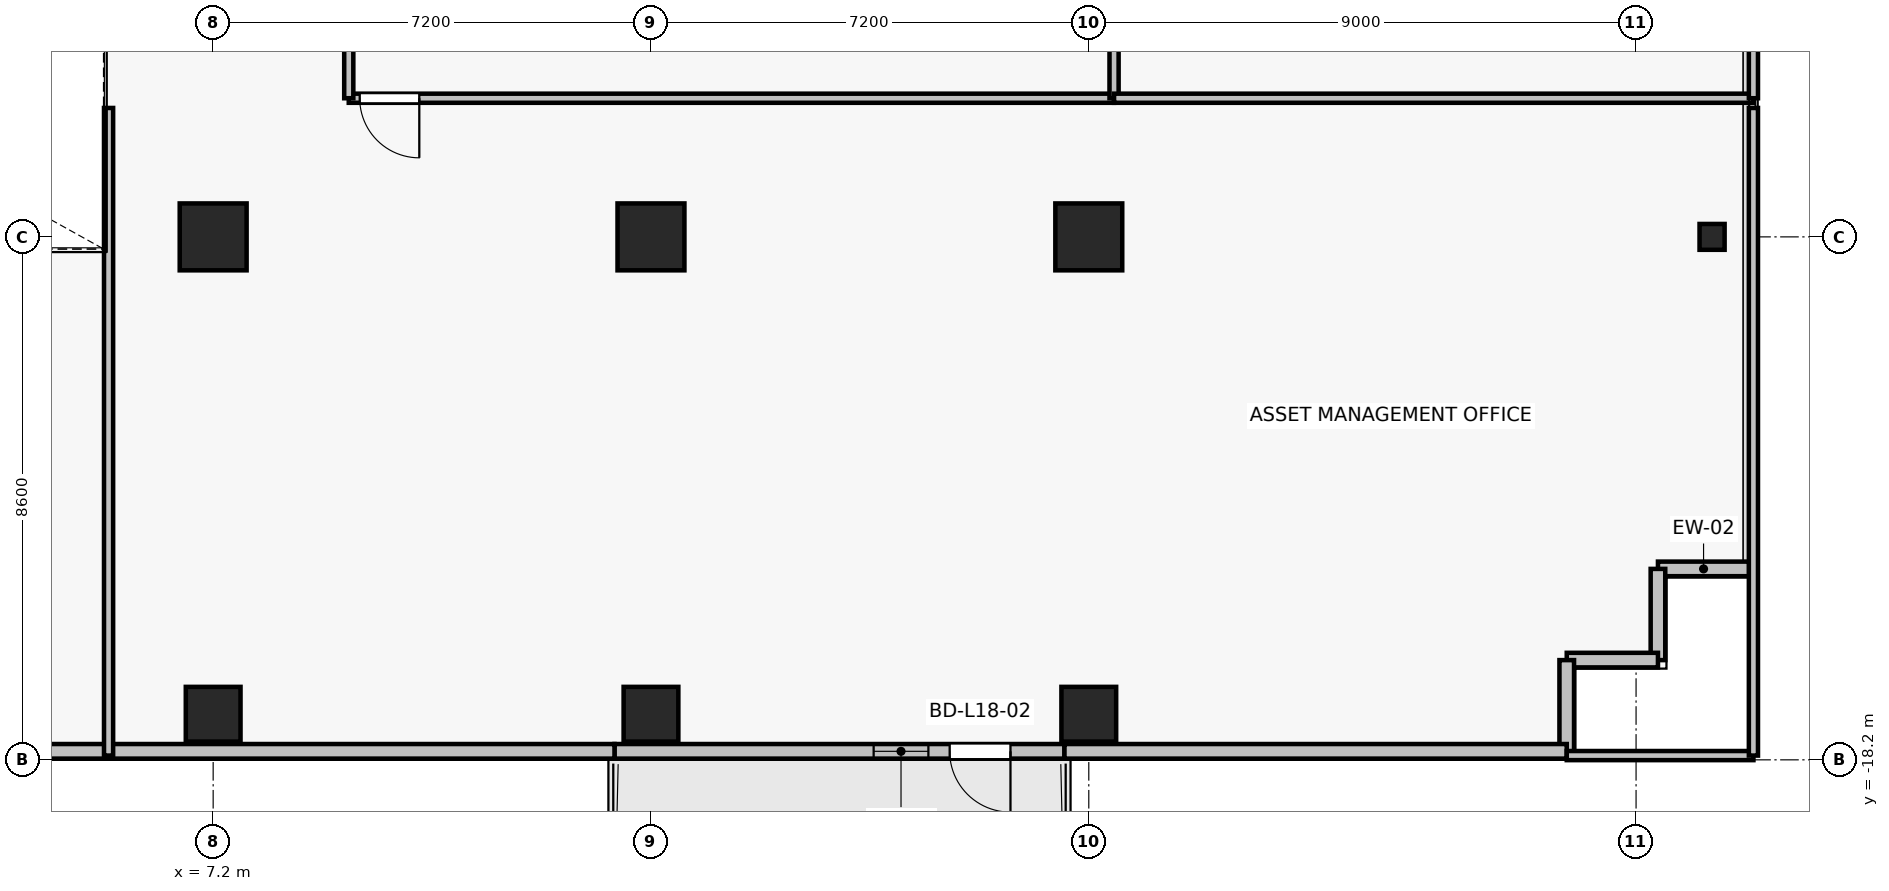
"""IFC4 building model, lengths in metres.
Left out: names, types, materials, properties, quantities, classifications, styles, units other than length and angle.
Written with IfcOpenShell. Run it as: python <this file> out.ifc"""

import sys

from ifc_helpers import new_model, si_unit, direction, frame, frame_2d, origin, origin_2d, place, context, subcontext, project, spatial, rectangle, i_section, extrude, source, transform, mapped, element, fill, save


model = new_model("IFC4")
c1 = context("Model", 3, precision=1e-05, world=origin(), true_north=direction((0.0, 1.0)))
c2 = subcontext(c1, "Body", "Model", "MODEL_VIEW")
j1 = project(units=[si_unit("LENGTHUNIT", "METRE"), si_unit("PLANEANGLEUNIT", "RADIAN")], contexts=[c1])
p1 = place(None, origin())
s1 = spatial("IfcSite", under=j1, at=p1, CompositionType="ELEMENT")
p2 = place(p1, origin())
s2 = spatial("IfcBuilding", under=s1, at=p2, CompositionType="ELEMENT")
p3 = place(p2, frame((0.0, 0.0, 67.0)))
s3 = spatial("IfcBuildingStorey", under=s2, at=p3, CompositionType="ELEMENT", Elevation=67.0)
for number, where, z_axis, x_axis in (
    (1, (7.2, -9.6, 0.0), (0.0, 0.0, 1.0), (1.0, 0.0, 0.0)),
    (2, (14.4, -9.6, 0.0), (0.0, 0.0, 1.0), (1.0, 0.0, 0.0)),
    (3, (21.6, -9.6, 0.0), (0.0, 0.0, 1.0), (1.0, 0.0, 0.0)),
):
    element("IfcColumn", number, at=place(p3, frame(where, z_axis=z_axis, x_axis=x_axis)), inside=s3, PredefinedType="COLUMN", context=c2, shape_type="SweptSolid", body=[
        extrude(rectangle(XDim=1.1, YDim=1.1, at=origin_2d()), origin(), (0.0, 0.0, 1.0), 3.3),
    ])
for number, where, z_axis, x_axis in (
    (4, (7.2, -17.45, 0.0), (0.0, 0.0, 1.0), (1.0, 0.0, 0.0)),
    (5, (14.4, -17.45, 0.0), (0.0, 0.0, 1.0), (1.0, 0.0, 0.0)),
    (6, (21.6, -17.45, 0.0), (0.0, 0.0, 1.0), (1.0, 0.0, 0.0)),
):
    element("IfcColumn", number, at=place(p3, frame(where, z_axis=z_axis, x_axis=x_axis)), inside=s3, PredefinedType="COLUMN", context=c2, shape_type="SweptSolid", body=[
        extrude(rectangle(XDim=0.9, YDim=0.9, at=origin_2d()), origin(), (0.0, 0.0, 1.0), 3.3),
    ])
p4 = place(p3, frame((31.85, -9.6, 0.0), z_axis=(0.0, 0.0, 1.0), x_axis=(1.0, 0.0, 0.0)))
e7 = element("IfcColumn", 7, at=p4, inside=s3, PredefinedType="COLUMN", context=c2, shape_type="SweptSolid", body=[
    extrude(i_section(OverallWidth=0.412, OverallDepth=0.425, WebThickness=0.026, FlangeThickness=0.039, FilletRadius=0.015, at=origin_2d()), origin(), (0.0, 0.0, 1.0), 3.3),
])
p5 = place(p3, frame((21.2, -18.06, 0.0), z_axis=(0.0, 0.0, 1.0), x_axis=(-1.0, 0.0, 0.0)))
e8 = element("IfcWall", 8, at=p5, inside=s3, PredefinedType="SOLIDWALL", context=c2, shape_type="SweptSolid", body=[
    extrude(rectangle(XDim=7.4, YDim=0.24, at=frame_2d((3.7, 0.0))), origin(), (0.0, 0.0, 1.0), 2.665),
])
p6 = place(p5, frame((0.888, 0.0, 0.0)))
e9 = element("IfcOpeningElement", 9, at=p6, cuts=e8, PredefinedType="OPENING", context=c2, shape_type="SweptSolid", body=[
    extrude(rectangle(XDim=1.0, YDim=2.2, at=frame_2d((0.5, 1.1))), frame((0.0, 0.13, 0.0), z_axis=(0.0, -1.0, 0.0), x_axis=(1.0, 0.0, 0.0)), (0.0, 0.0, 1.0), 0.26),
])
p7 = place(p5, frame((2.238, 0.0, 0.85)))
e10 = element("IfcOpeningElement", 10, at=p7, cuts=e8, PredefinedType="OPENING", context=c2, shape_type="SweptSolid", body=[
    extrude(rectangle(XDim=0.9, YDim=1.35, at=frame_2d((0.45, 0.675))), frame((0.0, 0.13, 0.0), z_axis=(0.0, -1.0, 0.0), x_axis=(1.0, 0.0, 0.0)), (0.0, 0.0, 1.0), 0.26),
])
for number, where, z_axis, x_axis in (
    (11, (30.96, -15.06, 0.0), (0.0, 0.0, 1.0), (1.0, 0.0, 0.0)),
    (12, (30.96, -16.56, 0.0), (0.0, 0.0, 1.0), (0.0, 1.0, 0.0)),
    (13, (29.46, -16.56, 0.0), (0.0, 0.0, 1.0), (1.0, 0.0, 0.0)),
    (14, (29.46, -18.06, 0.0), (0.0, 0.0, 1.0), (0.0, 1.0, 0.0)),
):
    element("IfcWall", number, at=place(p3, frame(where, z_axis=z_axis, x_axis=x_axis)), inside=s3, PredefinedType="SOLIDWALL", context=c2, shape_type="SweptSolid", body=[
        extrude(rectangle(XDim=1.5, YDim=0.24, at=frame_2d((0.75, 0.0))), origin(), (0.0, 0.0, 1.0), 3.075),
    ])
p8 = place(p3, frame((21.2, -18.06, 0.0), z_axis=(0.0, 0.0, 1.0), x_axis=(1.0, 0.0, 0.0)))
e15 = element("IfcWall", 15, at=p8, inside=s3, PredefinedType="SOLIDWALL", context=c2, shape_type="SweptSolid", body=[
    extrude(rectangle(XDim=8.26, YDim=0.24, at=frame_2d((4.13, 0.0))), origin(), (0.0, 0.0, 1.0), 3.075),
])
p9 = place(p3, frame((3.34, -18.06, 0.0), z_axis=(0.0, 0.0, 1.0), x_axis=(1.0, 0.0, 0.0)))
e16 = element("IfcWall", 16, at=p9, inside=s3, PredefinedType="SOLIDWALL", context=c2, shape_type="SweptSolid", body=[
    extrude(rectangle(XDim=10.46, YDim=0.24, at=frame_2d((5.23, 0.0))), origin(), (0.0, 0.0, 1.0), 2.665),
])
p10 = place(p3, frame((22.015, -7.32, 0.0), z_axis=(0.0, 0.0, 1.0), x_axis=(-1.0, 0.0, 0.0)))
e17 = element("IfcWall", 17, at=p10, inside=s3, PredefinedType="PARTITIONING", context=c2, shape_type="SweptSolid", body=[
    extrude(rectangle(XDim=12.585, YDim=0.15, at=frame_2d((6.293, 0.0))), origin(), (0.0, 0.0, 1.0), 2.465),
])
p11 = place(p10, frame((11.426, 0.0, 0.0)))
e18 = element("IfcOpeningElement", 18, at=p11, cuts=e17, PredefinedType="OPENING", context=c2, shape_type="SweptSolid", body=[
    extrude(rectangle(XDim=0.98, YDim=2.15, at=frame_2d((0.49, 1.075))), frame((0.0, 0.085, 0.0), z_axis=(0.0, -1.0, 0.0), x_axis=(1.0, 0.0, 0.0)), (0.0, 0.0, 1.0), 0.17),
])
for number, where, z_axis, x_axis in (
    (19, (9.43, -7.32, 0.0), (0.0, 0.0, 1.0), (0.0, 1.0, 0.0)),
    (20, (22.015, -3.83, 0.0), (0.0, 0.0, 1.0), (0.0, -1.0, 0.0)),
):
    element("IfcWall", number, at=place(p3, frame(where, z_axis=z_axis, x_axis=x_axis)), inside=s3, PredefinedType="PARTITIONING", context=c2, shape_type="SweptSolid", body=[
        extrude(rectangle(XDim=3.49, YDim=0.15, at=frame_2d((1.745, 0.0))), origin(), (0.0, 0.0, 1.0), 2.565),
    ])
p12 = place(p3, frame((32.53, -7.32, 0.0), z_axis=(0.0, 0.0, 1.0), x_axis=(-1.0, 0.0, 0.0)))
e21 = element("IfcWall", 21, at=p12, inside=s3, PredefinedType="PARTITIONING", context=c2, shape_type="SweptSolid", body=[
    extrude(rectangle(XDim=10.515, YDim=0.15, at=frame_2d((5.257, 0.0))), origin(), (0.0, 0.0, 1.0), 2.465),
])
p13 = place(p3, frame((32.53, -3.83, 0.0), z_axis=(0.0, 0.0, 1.0), x_axis=(0.0, -1.0, 0.0)))
e22 = element("IfcWall", 22, at=p13, inside=s3, PredefinedType="PARTITIONING", context=c2, shape_type="SweptSolid", body=[
    extrude(rectangle(XDim=3.49, YDim=0.15, at=frame_2d((1.745, 0.0))), origin(), (0.0, 0.0, 1.0), 3.075),
])
p14 = place(p3, frame((32.53, -18.13, 0.0), z_axis=(0.0, 0.0, 1.0), x_axis=(-1.0, 0.0, 0.0)))
e23 = element("IfcWall", 23, at=p14, inside=s3, PredefinedType="PARTITIONING", context=c2, shape_type="SweptSolid", body=[
    extrude(rectangle(XDim=3.07, YDim=0.15, at=frame_2d((1.535, 0.0))), origin(), (0.0, 0.0, 1.0), 2.665),
])
p15 = place(p3, frame((5.48, -18.13, 0.0), z_axis=(0.0, 0.0, 1.0), x_axis=(0.0, 1.0, 0.0)))
e24 = element("IfcWall", 24, at=p15, inside=s3, PredefinedType="PARTITIONING", context=c2, shape_type="SweptSolid", body=[
    extrude(rectangle(XDim=10.65, YDim=0.15, at=frame_2d((5.325, 0.0))), origin(), (0.0, 0.0, 1.0), 2.465),
])
p16 = place(p3, frame((32.53, -7.48, 0.0), z_axis=(0.0, 0.0, 1.0), x_axis=(0.0, -1.0, 0.0)))
e25 = element("IfcWall", 25, at=p16, inside=s3, PredefinedType="PARTITIONING", context=c2, shape_type="SweptSolid", body=[
    extrude(rectangle(XDim=10.65, YDim=0.15, at=frame_2d((5.325, 0.0))), origin(), (0.0, 0.0, 1.0), 2.665),
])
m1 = source(origin(), c2, "Body", "SweptSolid", [
    extrude(rectangle(XDim=1.0, YDim=2.2, at=frame_2d((0.5, 1.1))), frame((0.0, 0.025, 0.0), z_axis=(0.0, -1.0, 0.0), x_axis=(1.0, 0.0, 0.0)), (0.0, 0.0, 1.0), 0.05),
])
p17 = place(p6, origin())
e26 = element("IfcDoor", 26, at=p17, inside=s3, OperationType="SINGLE_SWING_LEFT", PredefinedType="DOOR", context=c2, shape_type="MappedRepresentation", body=[
    mapped(m1, transform((0.0, 0.0, 0.0), x_axis=(1.0, 0.0, 0.0), y_axis=(0.0, 1.0, 0.0), z_axis=(0.0, 0.0, 1.0), scale=1.0)),
])
fill(e9, e26)
m2 = source(origin(), c2, "Body", "SweptSolid", [
    extrude(rectangle(XDim=0.9, YDim=1.35, at=frame_2d((0.45, 0.675))), frame((0.0, 0.03, 0.0), z_axis=(0.0, -1.0, 0.0), x_axis=(1.0, 0.0, 0.0)), (0.0, 0.0, 1.0), 0.06),
])
p18 = place(p7, origin())
e27 = element("IfcWindow", 27, at=p18, inside=s3, PartitioningType="SINGLE_PANEL", PredefinedType="WINDOW", context=c2, shape_type="MappedRepresentation", body=[
    mapped(m2, transform((0.0, 0.0, 0.0), x_axis=(1.0, 0.0, 0.0), y_axis=(0.0, 1.0, 0.0), z_axis=(0.0, 0.0, 1.0), scale=1.0)),
])
fill(e10, e27)
m3 = source(origin(), c2, "Body", "SweptSolid", [
    extrude(rectangle(XDim=0.98, YDim=2.15, at=frame_2d((0.49, 1.075))), frame((0.0, 0.025, 0.0), z_axis=(0.0, -1.0, 0.0), x_axis=(1.0, 0.0, 0.0)), (0.0, 0.0, 1.0), 0.05),
])
p19 = place(p11, origin())
e28 = element("IfcDoor", 28, at=p19, inside=s3, OperationType="SINGLE_SWING_LEFT", PredefinedType="DOOR", context=c2, shape_type="MappedRepresentation", body=[
    mapped(m3, transform((0.0, 0.0, 0.0), x_axis=(1.0, 0.0, 0.0), y_axis=(0.0, 1.0, 0.0), z_axis=(0.0, 0.0, 1.0), scale=1.0)),
])
fill(e18, e28)
save(model, sys.argv[1])
